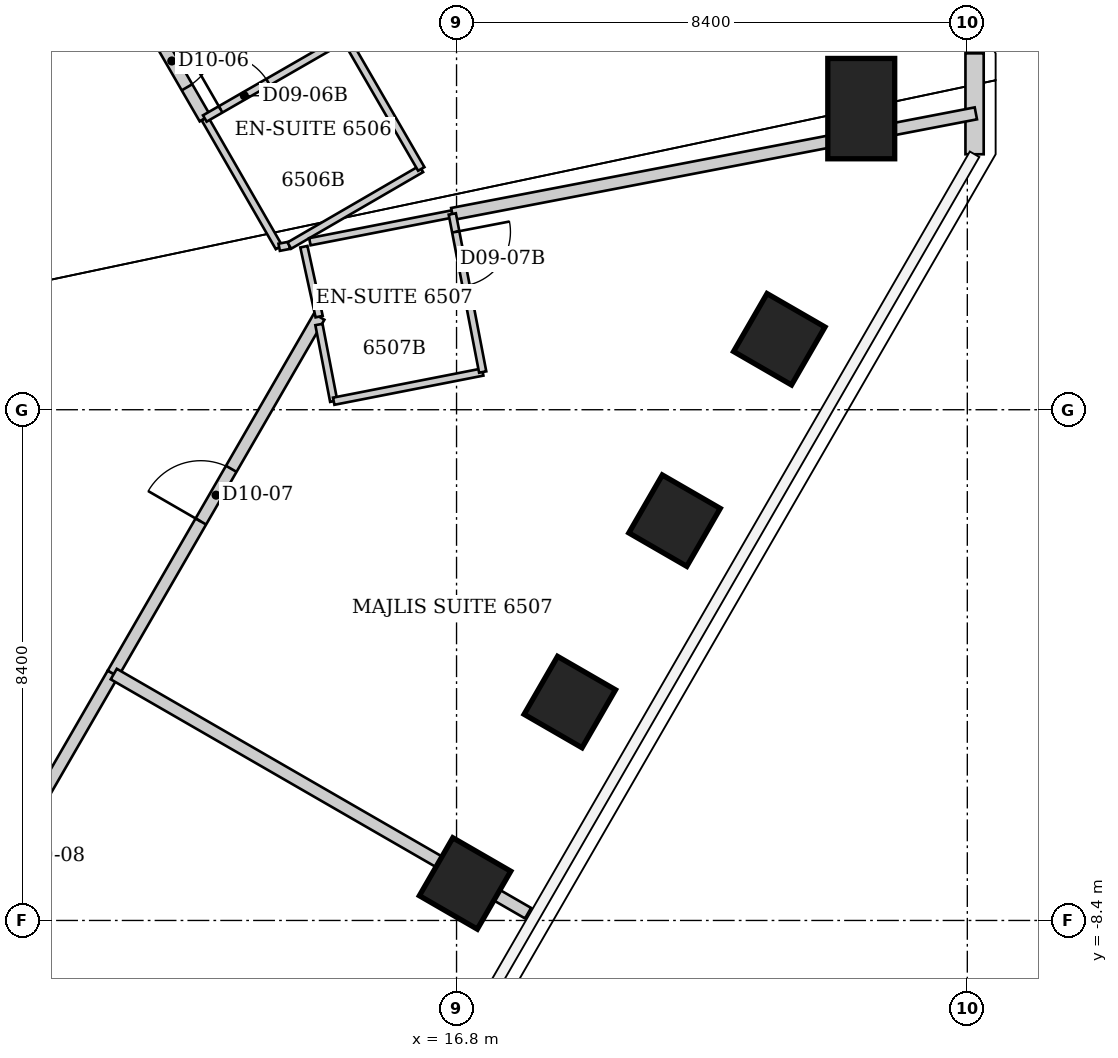
"""IFC4 building model, lengths in metres.
Left out: names, types, materials, properties, quantities, classifications, styles, units other than length and angle.
Written with IfcOpenShell. Run it as: python <this file> out.ifc"""

import sys

from ifc_helpers import new_model, si_unit, direction, frame, frame_2d, origin, origin_2d, place, context, subcontext, project, spatial, rectangle, extrude, element, fill, save


model = new_model("IFC4")
c1 = context("Model", 3, precision=1e-05, world=origin(), true_north=direction((0.0, 1.0)))
c2 = subcontext(c1, "Body", "Model", "MODEL_VIEW")
j1 = project(units=[si_unit("LENGTHUNIT", "METRE"), si_unit("PLANEANGLEUNIT", "RADIAN")], contexts=[c1])
p1 = place(None, origin())
s1 = spatial("IfcSite", under=j1, at=p1, CompositionType="ELEMENT")
p2 = place(p1, origin())
s2 = spatial("IfcBuilding", under=s1, at=p2, CompositionType="ELEMENT")
p3 = place(p2, frame((0.0, 0.0, 260.8)))
s3 = spatial("IfcBuildingStorey", under=s2, at=p3, CompositionType="ELEMENT", Elevation=260.8)
p4 = place(p3, frame((23.456, 4.952, 0.0), z_axis=(0.0, 0.0, 1.0), x_axis=(1.0, 0.0, 0.0)))
e1 = element("IfcColumn", 1, at=p4, inside=s3, PredefinedType="COLUMN", context=c2, shape_type="SweptSolid", body=[
    extrude(rectangle(XDim=1.1, YDim=1.65, at=origin_2d()), origin(), (0.0, 0.0, 1.0), 3.8),
])
for number, where, z_axis, x_axis in (
    (2, (22.108, 1.159, 0.0), (0.0, 0.0, 1.0), (0.866, -0.5, 0.0)),
    (3, (20.385, -1.824, 0.0), (0.0, 0.0, 1.0), (0.866, -0.5, 0.0)),
    (4, (18.663, -4.808, 0.0), (0.0, 0.0, 1.0), (0.866, -0.5, 0.0)),
    (5, (16.94, -7.792, 0.0), (0.0, 0.0, 1.0), (0.866, -0.5, 0.0)),
):
    element("IfcColumn", number, at=place(p3, frame(where, z_axis=z_axis, x_axis=x_axis)), inside=s3, PredefinedType="COLUMN", context=c2, shape_type="SweptSolid", body=[
        extrude(rectangle(XDim=1.1, YDim=1.1, at=origin_2d()), origin(), (0.0, 0.0, 1.0), 3.8),
    ])
p5 = place(p3, frame((25.319, 5.862, 0.0), z_axis=(0.0, 0.0, 1.0), x_axis=(0.0, -1.0, 0.0)))
e6 = element("IfcWall", 6, at=p5, inside=s3, PredefinedType="SOLIDWALL", context=c2, shape_type="SweptSolid", body=[
    extrude(rectangle(XDim=1.66, YDim=0.3, at=frame_2d((0.83, 0.0))), origin(), (0.0, 0.0, 1.0), 3.64),
])
p6 = place(p3, frame((7.69, -10.33, 0.0), z_axis=(0.0, 0.0, 1.0), x_axis=(0.500177633683, 0.865922822637, 0.0)))
e7 = element("IfcWall", 7, at=p6, inside=s3, PredefinedType="PARTITIONING", context=c2, shape_type="SweptSolid", body=[
    extrude(rectangle(XDim=6.917, YDim=0.2, at=frame_2d((3.459, 0.0))), origin(), (0.0, 0.0, 1.0), 3.64),
])
p7 = place(p6, frame((2.959, 0.0, 0.0)))
e8 = element("IfcOpeningElement", 8, at=p7, cuts=e7, PredefinedType="OPENING", context=c2, shape_type="SweptSolid", body=[
    extrude(rectangle(XDim=1.0, YDim=2.13, at=frame_2d((0.5, 1.065))), frame((0.0, 0.1, 0.0), z_axis=(0.0, -1.0, 0.0), x_axis=(1.0, 0.0, 0.0)), (0.0, 0.0, 1.0), 0.2),
])
p8 = place(p3, frame((11.15, -4.34, 0.0), z_axis=(0.0, 0.0, 1.0), x_axis=(0.500113178326, 0.865960050386, 0.0)))
e9 = element("IfcWall", 9, at=p8, inside=s3, PredefinedType="PARTITIONING", context=c2, shape_type="SweptSolid", body=[
    extrude(rectangle(XDim=6.779, YDim=0.2, at=frame_2d((3.389, 0.0))), origin(), (0.0, 0.0, 1.0), 3.64),
])
p9 = place(p8, frame((2.889, 0.0, 0.0)))
e10 = element("IfcOpeningElement", 10, at=p9, cuts=e9, PredefinedType="OPENING", context=c2, shape_type="SweptSolid", body=[
    extrude(rectangle(XDim=1.0, YDim=2.13, at=frame_2d((0.5, 1.065))), frame((0.0, 0.1, 0.0), z_axis=(0.0, -1.0, 0.0), x_axis=(1.0, 0.0, 0.0)), (0.0, 0.0, 1.0), 0.2),
])
p10 = place(p3, frame((11.571, 6.681, 0.0), z_axis=(0.0, 0.0, 1.0), x_axis=(0.500374530646, -0.865809060406, 0.0)))
e11 = element("IfcWall", 11, at=p10, inside=s3, PredefinedType="PARTITIONING", context=c2, shape_type="SweptSolid", body=[
    extrude(rectangle(XDim=2.182, YDim=0.2, at=frame_2d((1.091, 0.0))), origin(), (0.0, 0.0, 1.0), 3.64),
])
p11 = place(p10, frame((0.591, 0.0, 0.0)))
e12 = element("IfcOpeningElement", 12, at=p11, cuts=e11, PredefinedType="OPENING", context=c2, shape_type="SweptSolid", body=[
    extrude(rectangle(XDim=1.0, YDim=2.13, at=frame_2d((0.5, 1.065))), frame((0.0, 0.1, 0.0), z_axis=(0.0, -1.0, 0.0), x_axis=(1.0, 0.0, 0.0)), (0.0, 0.0, 1.0), 0.2),
])
p12 = place(p3, frame((12.66, 4.79, 0.0), z_axis=(0.0, 0.0, 1.0), x_axis=(0.498748634132, -0.866746675766, 0.0)))
e13 = element("IfcWall", 13, at=p12, inside=s3, PredefinedType="PARTITIONING", context=c2, shape_type="SweptSolid", body=[
    extrude(rectangle(XDim=2.446, YDim=0.12, at=frame_2d((1.223, 0.0))), origin(), (0.0, 0.0, 1.0), 3.64),
])
p13 = place(p3, frame((14.048, 2.704, 0.0), z_axis=(0.0, 0.0, 1.0), x_axis=(-0.981954528773, -0.189117168504, 0.0)))
e14 = element("IfcWall", 14, at=p13, inside=s3, PredefinedType="PARTITIONING", context=c2, shape_type="SweptSolid", body=[
    extrude(rectangle(XDim=0.168, YDim=0.12, at=frame_2d((0.084, 0.0))), origin(), (0.0, 0.0, 1.0), 3.64),
])
p14 = place(p3, frame((14.05, 2.7, 0.0), z_axis=(0.0, 0.0, 1.0), x_axis=(0.864779406007, 0.502151948065, 0.0)))
e15 = element("IfcWall", 15, at=p14, inside=s3, PredefinedType="PARTITIONING", context=c2, shape_type="SweptSolid", body=[
    extrude(rectangle(XDim=2.509, YDim=0.12, at=frame_2d((1.255, 0.0))), origin(), (0.0, 0.0, 1.0), 3.64),
])
p15 = place(p3, frame((14.537, 1.402, 0.0), z_axis=(0.0, 0.0, 1.0), x_axis=(0.189058811395, -0.981965766121, 0.0)))
e16 = element("IfcWall", 16, at=p15, inside=s3, PredefinedType="PARTITIONING", context=c2, shape_type="SweptSolid", body=[
    extrude(rectangle(XDim=1.285, YDim=0.12, at=frame_2d((0.643, 0.0))), origin(), (0.0, 0.0, 1.0), 3.64),
])
p16 = place(p3, frame((14.54, 1.531, 0.0), z_axis=(0.0, 0.0, 1.0), x_axis=(-0.213239076566, 0.977000049245, 0.0)))
e17 = element("IfcWall", 17, at=p16, inside=s3, PredefinedType="PARTITIONING", context=c2, shape_type="SweptSolid", body=[
    extrude(rectangle(XDim=1.177, YDim=0.12, at=frame_2d((0.588, 0.0))), origin(), (0.0, 0.0, 1.0), 3.64),
])
p17 = place(p3, frame((14.78, 0.14, 0.0), z_axis=(0.0, 0.0, 1.0), x_axis=(0.981325695508, 0.192353526962, 0.0)))
e18 = element("IfcWall", 18, at=p17, inside=s3, PredefinedType="PARTITIONING", context=c2, shape_type="SweptSolid", body=[
    extrude(rectangle(XDim=2.497, YDim=0.12, at=frame_2d((1.248, 0.0))), origin(), (0.0, 0.0, 1.0), 3.64),
])
p18 = place(p3, frame((14.97, 6.12, 0.0), z_axis=(0.0, 0.0, 1.0), x_axis=(-0.866615255992, -0.498976951453, 0.0)))
e19 = element("IfcWall", 19, at=p18, inside=s3, PredefinedType="PARTITIONING", context=c2, shape_type="SweptSolid", body=[
    extrude(rectangle(XDim=2.666, YDim=0.12, at=frame_2d((1.333, 0.0))), origin(), (0.0, 0.0, 1.0), 3.64),
])
p19 = place(p18, frame((1.466, 0.0, 0.0)))
e20 = element("IfcOpeningElement", 20, at=p19, cuts=e19, PredefinedType="OPENING", context=c2, shape_type="SweptSolid", body=[
    extrude(rectangle(XDim=0.9, YDim=2.03, at=frame_2d((0.45, 1.015))), frame((0.0, 0.06, 0.0), z_axis=(0.0, -1.0, 0.0), x_axis=(1.0, 0.0, 0.0)), (0.0, 0.0, 1.0), 0.12),
])
p20 = place(p3, frame((16.22, 3.96, 0.0), z_axis=(0.0, 0.0, 1.0), x_axis=(-0.500893576935, 0.865508881864, 0.0)))
e21 = element("IfcWall", 21, at=p20, inside=s3, PredefinedType="PARTITIONING", context=c2, shape_type="SweptSolid", body=[
    extrude(rectangle(XDim=2.496, YDim=0.12, at=frame_2d((1.248, 0.0))), origin(), (0.0, 0.0, 1.0), 3.64),
])
p21 = place(p3, frame((16.73, 3.22, 0.0), z_axis=(0.0, 0.0, 1.0), x_axis=(-0.981490592026, -0.19151035942, 0.0)))
e22 = element("IfcWall", 22, at=p21, inside=s3, PredefinedType="PARTITIONING", context=c2, shape_type="SweptSolid", body=[
    extrude(rectangle(XDim=2.386, YDim=0.12, at=frame_2d((1.193, 0.0))), origin(), (0.0, 0.0, 1.0), 3.64),
])
p22 = place(p3, frame((16.73, 3.22, 0.0), z_axis=(0.0, 0.0, 1.0), x_axis=(0.982039995549, 0.188672857462, 0.0)))
e23 = element("IfcWall", 23, at=p22, inside=s3, PredefinedType="PARTITIONING", context=c2, shape_type="SweptSolid", body=[
    extrude(rectangle(XDim=8.768, YDim=0.2, at=frame_2d((4.384, 0.0))), origin(), (0.0, 0.0, 1.0), 3.64),
])
p23 = place(p3, frame((17.23, 0.62, 0.0), z_axis=(0.0, 0.0, 1.0), x_axis=(-0.18885765444, 0.982004473696, 0.0)))
e24 = element("IfcWall", 24, at=p23, inside=s3, PredefinedType="PARTITIONING", context=c2, shape_type="SweptSolid", body=[
    extrude(rectangle(XDim=2.647, YDim=0.12, at=frame_2d((1.324, 0.0))), origin(), (0.0, 0.0, 1.0), 3.64),
])
p24 = place(p23, frame((1.448, 0.0, 0.0)))
e25 = element("IfcOpeningElement", 25, at=p24, cuts=e24, PredefinedType="OPENING", context=c2, shape_type="SweptSolid", body=[
    extrude(rectangle(XDim=0.9, YDim=2.03, at=frame_2d((0.45, 1.015))), frame((0.0, 0.06, 0.0), z_axis=(0.0, -1.0, 0.0), x_axis=(1.0, 0.0, 0.0)), (0.0, 0.0, 1.0), 0.12),
])
p25 = place(p3, frame((17.976, -8.28, 0.0), z_axis=(0.0, 0.0, 1.0), x_axis=(-0.866080683341, 0.499904240773, 0.0)))
e26 = element("IfcWall", 26, at=p25, inside=s3, PredefinedType="PARTITIONING", context=c2, shape_type="SweptSolid", body=[
    extrude(rectangle(XDim=7.867, YDim=0.2, at=frame_2d((3.933, 0.0))), origin(), (0.0, 0.0, 1.0), 3.64),
])
p26 = place(p11, origin())
e27 = element("IfcDoor", 27, at=p26, inside=s3, OperationType="SINGLE_SWING_LEFT", PredefinedType="DOOR", context=c2, shape_type="SweptSolid", body=[
    extrude(rectangle(XDim=1.0, YDim=2.13, at=frame_2d((0.5, 1.065))), frame((0.0, 0.025, 0.0), z_axis=(0.0, -1.0, 0.0), x_axis=(1.0, 0.0, 0.0)), (0.0, 0.0, 1.0), 0.05),
])
fill(e12, e27)
p27 = place(p19, origin())
e28 = element("IfcDoor", 28, at=p27, inside=s3, OperationType="SINGLE_SWING_RIGHT", PredefinedType="DOOR", context=c2, shape_type="SweptSolid", body=[
    extrude(rectangle(XDim=0.9, YDim=2.03, at=frame_2d((0.45, 1.015))), frame((0.0, 0.025, 0.0), z_axis=(0.0, -1.0, 0.0), x_axis=(1.0, 0.0, 0.0)), (0.0, 0.0, 1.0), 0.05),
])
fill(e20, e28)
p28 = place(p9, origin())
e29 = element("IfcDoor", 29, at=p28, inside=s3, OperationType="SINGLE_SWING_LEFT", PredefinedType="DOOR", context=c2, shape_type="SweptSolid", body=[
    extrude(rectangle(XDim=1.0, YDim=2.13, at=frame_2d((0.5, 1.065))), frame((0.0, 0.025, 0.0), z_axis=(0.0, -1.0, 0.0), x_axis=(1.0, 0.0, 0.0)), (0.0, 0.0, 1.0), 0.05),
])
fill(e10, e29)
p29 = place(p24, origin())
e30 = element("IfcDoor", 30, at=p29, inside=s3, OperationType="SINGLE_SWING_RIGHT", PredefinedType="DOOR", context=c2, shape_type="SweptSolid", body=[
    extrude(rectangle(XDim=0.9, YDim=2.03, at=frame_2d((0.45, 1.015))), frame((0.0, 0.025, 0.0), z_axis=(0.0, -1.0, 0.0), x_axis=(1.0, 0.0, 0.0)), (0.0, 0.0, 1.0), 0.05),
])
fill(e25, e30)
save(model, sys.argv[1])
